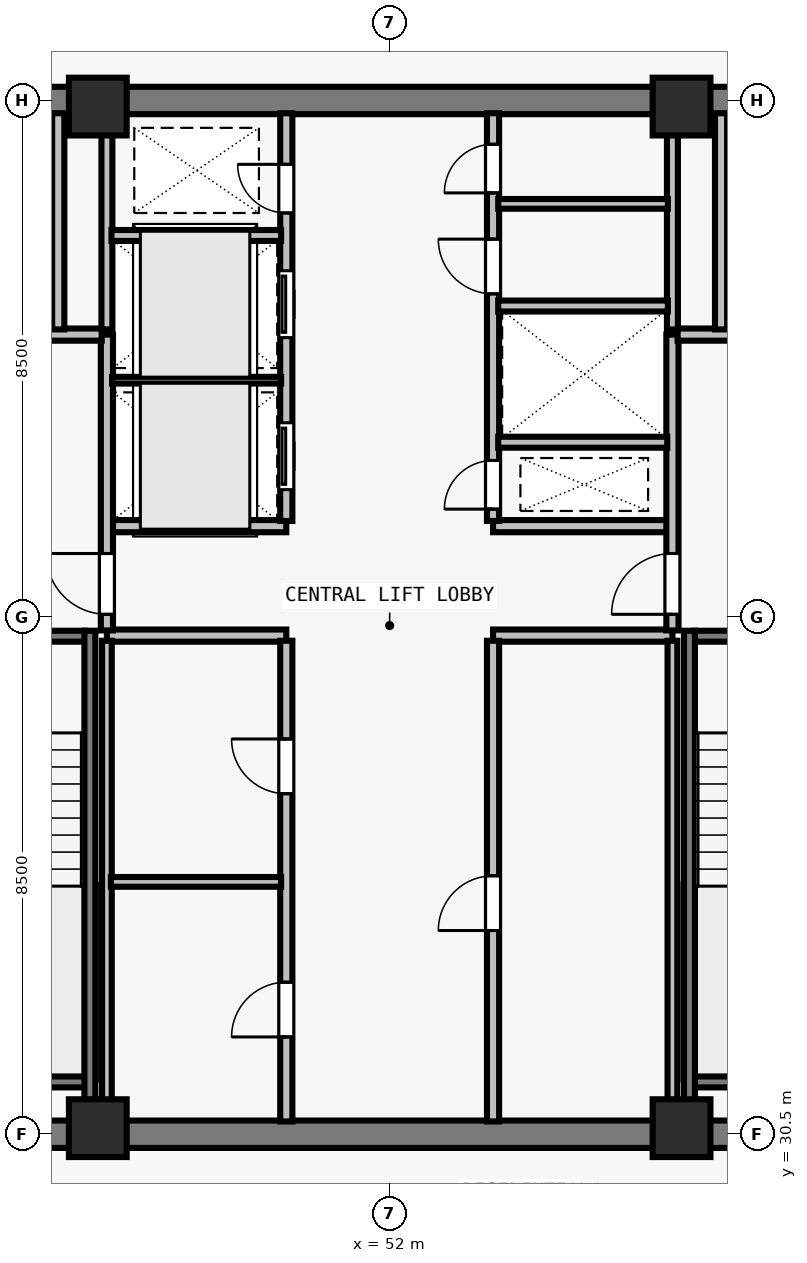
"""IFC4 building model, lengths in metres.
Left out: names, types, materials, properties, quantities, classifications, styles, units other than length and angle.
Written with IfcOpenShell. Run it as: python <this file> out.ifc"""

import sys

from ifc_helpers import new_model, si_unit, direction, frame, frame_2d, origin, origin_2d, place, context, subcontext, project, spatial, rectangle, extrude, element, fill, save


model = new_model("IFC4")
c1 = context("Model", 3, precision=1e-05, world=origin(), true_north=direction((0.0, 1.0)))
c2 = subcontext(c1, "Body", "Model", "MODEL_VIEW")
j1 = project(units=[si_unit("LENGTHUNIT", "METRE"), si_unit("PLANEANGLEUNIT", "RADIAN")], contexts=[c1])
p1 = place(None, origin())
s1 = spatial("IfcSite", under=j1, at=p1, CompositionType="ELEMENT")
p2 = place(p1, origin())
s2 = spatial("IfcBuilding", under=s1, at=p2, CompositionType="ELEMENT")
p3 = place(p2, frame((0.0, 0.0, 255.0)))
s3 = spatial("IfcBuildingStorey", under=s2, at=p3, CompositionType="ELEMENT", Elevation=255.0)
for number, where, z_axis, x_axis in (
    (1, (47.2, 30.6, 0.0), (0.0, 0.0, 1.0), (1.0, 0.0, 0.0)),
    (2, (56.8, 30.6, 0.0), (0.0, 0.0, 1.0), (1.0, 0.0, 0.0)),
    (3, (47.2, 47.4, 0.0), (0.0, 0.0, 1.0), (1.0, 0.0, 0.0)),
    (4, (56.8, 47.4, 0.0), (0.0, 0.0, 1.0), (1.0, 0.0, 0.0)),
):
    element("IfcColumn", number, at=place(p3, frame(where, z_axis=z_axis, x_axis=x_axis)), inside=s3, PredefinedType="COLUMN", context=c2, shape_type="SweptSolid", body=[
        extrude(rectangle(XDim=0.95, YDim=0.95, at=origin_2d()), origin(), (0.0, 0.0, 1.0), 3.5),
    ])
for number, where, z_axis, x_axis in (
    (5, (43.275, 30.5, 0.0), (0.0, 0.0, 1.0), (1.0, 0.0, 0.0)),
    (6, (43.275, 47.5, 0.0), (0.0, 0.0, 1.0), (1.0, 0.0, 0.0)),
):
    element("IfcWall", number, at=place(p3, frame(where, z_axis=z_axis, x_axis=x_axis)), inside=s3, PredefinedType="SHEAR", context=c2, shape_type="SweptSolid", body=[
        extrude(rectangle(XDim=17.45, YDim=0.45, at=frame_2d((8.725, 0.0))), origin(), (0.0, 0.0, 1.0), 3.29),
    ])
for number, where, z_axis, x_axis in (
    (7, (47.35, 38.7, 0.0), (0.0, 0.0, 1.0), (1.0, 0.0, 0.0)),
    (8, (47.35, 40.5, 0.0), (0.0, 0.0, 1.0), (1.0, 0.0, 0.0)),
    (9, (53.7, 38.7, 0.0), (0.0, 0.0, 1.0), (1.0, 0.0, 0.0)),
    (10, (53.7, 40.5, 0.0), (0.0, 0.0, 1.0), (1.0, 0.0, 0.0)),
):
    element("IfcWall", number, at=place(p3, frame(where, z_axis=z_axis, x_axis=x_axis)), inside=s3, PredefinedType="SOLIDWALL", context=c2, shape_type="SweptSolid", body=[
        extrude(rectangle(XDim=2.95, YDim=0.2, at=frame_2d((1.475, 0.0))), origin(), (0.0, 0.0, 1.0), 3.29),
    ])
p4 = place(p3, frame((50.3, 30.71, 0.0), z_axis=(0.0, 0.0, 1.0), x_axis=(0.0, 1.0, 0.0)))
e11 = element("IfcWall", 11, at=p4, inside=s3, PredefinedType="SOLIDWALL", context=c2, shape_type="SweptSolid", body=[
    extrude(rectangle(XDim=7.905, YDim=0.2, at=frame_2d((3.953, 0.0))), origin(), (0.0, 0.0, 1.0), 3.29),
])
p5 = place(p4, frame((1.39, 0.0, 0.0)))
e12 = element("IfcOpeningElement", 12, at=p5, cuts=e11, PredefinedType="OPENING", context=c2, shape_type="SweptSolid", body=[
    extrude(rectangle(XDim=0.9, YDim=2.12, at=frame_2d((0.45, 1.06))), frame((0.0, 0.11, 0.0), z_axis=(0.0, -1.0, 0.0), x_axis=(1.0, 0.0, 0.0)), (0.0, 0.0, 1.0), 0.22),
])
p6 = place(p4, frame((5.39, 0.0, 0.0)))
e13 = element("IfcOpeningElement", 13, at=p6, cuts=e11, PredefinedType="OPENING", context=c2, shape_type="SweptSolid", body=[
    extrude(rectangle(XDim=0.9, YDim=2.12, at=frame_2d((0.45, 1.06))), frame((0.0, 0.11, 0.0), z_axis=(0.0, -1.0, 0.0), x_axis=(1.0, 0.0, 0.0)), (0.0, 0.0, 1.0), 0.22),
])
p7 = place(p3, frame((53.7, 30.71, 0.0), z_axis=(0.0, 0.0, 1.0), x_axis=(0.0, 1.0, 0.0)))
e14 = element("IfcWall", 14, at=p7, inside=s3, PredefinedType="SOLIDWALL", context=c2, shape_type="SweptSolid", body=[
    extrude(rectangle(XDim=7.905, YDim=0.2, at=frame_2d((3.953, 0.0))), origin(), (0.0, 0.0, 1.0), 3.29),
])
p8 = place(p7, frame((3.14, 0.0, 0.0)))
e15 = element("IfcOpeningElement", 15, at=p8, cuts=e14, PredefinedType="OPENING", context=c2, shape_type="SweptSolid", body=[
    extrude(rectangle(XDim=0.9, YDim=2.12, at=frame_2d((0.45, 1.06))), frame((0.0, 0.11, 0.0), z_axis=(0.0, -1.0, 0.0), x_axis=(1.0, 0.0, 0.0)), (0.0, 0.0, 1.0), 0.22),
])
p9 = place(p3, frame((50.3, 40.585, 0.0), z_axis=(0.0, 0.0, 1.0), x_axis=(0.0, 1.0, 0.0)))
e16 = element("IfcWall", 16, at=p9, inside=s3, PredefinedType="SOLIDWALL", context=c2, shape_type="SweptSolid", body=[
    extrude(rectangle(XDim=6.705, YDim=0.2, at=frame_2d((3.353, 0.0))), origin(), (0.0, 0.0, 1.0), 3.29),
])
p10 = place(p9, frame((0.515, 0.0, 0.0)))
e17 = element("IfcOpeningElement", 17, at=p10, cuts=e16, PredefinedType="OPENING", context=c2, shape_type="SweptSolid", body=[
    extrude(rectangle(XDim=1.1, YDim=2.2, at=frame_2d((0.55, 1.1))), frame((0.0, 0.11, 0.0), z_axis=(0.0, -1.0, 0.0), x_axis=(1.0, 0.0, 0.0)), (0.0, 0.0, 1.0), 0.22),
])
p11 = place(p9, frame((3.015, 0.0, 0.0)))
e18 = element("IfcOpeningElement", 18, at=p11, cuts=e16, PredefinedType="OPENING", context=c2, shape_type="SweptSolid", body=[
    extrude(rectangle(XDim=1.1, YDim=2.2, at=frame_2d((0.55, 1.1))), frame((0.0, 0.11, 0.0), z_axis=(0.0, -1.0, 0.0), x_axis=(1.0, 0.0, 0.0)), (0.0, 0.0, 1.0), 0.22),
])
p12 = place(p9, frame((5.065, 0.0, 0.0)))
e19 = element("IfcOpeningElement", 19, at=p12, cuts=e16, PredefinedType="OPENING", context=c2, shape_type="SweptSolid", body=[
    extrude(rectangle(XDim=0.8, YDim=2.08, at=frame_2d((0.4, 1.04))), frame((0.0, 0.11, 0.0), z_axis=(0.0, -1.0, 0.0), x_axis=(1.0, 0.0, 0.0)), (0.0, 0.0, 1.0), 0.22),
])
p13 = place(p3, frame((53.7, 40.585, 0.0), z_axis=(0.0, 0.0, 1.0), x_axis=(0.0, 1.0, 0.0)))
e20 = element("IfcWall", 20, at=p13, inside=s3, PredefinedType="SOLIDWALL", context=c2, shape_type="SweptSolid", body=[
    extrude(rectangle(XDim=6.705, YDim=0.2, at=frame_2d((3.353, 0.0))), origin(), (0.0, 0.0, 1.0), 3.29),
])
p14 = place(p13, frame((0.195, 0.0, 0.0)))
e21 = element("IfcOpeningElement", 21, at=p14, cuts=e20, PredefinedType="OPENING", context=c2, shape_type="SweptSolid", body=[
    extrude(rectangle(XDim=0.8, YDim=2.08, at=frame_2d((0.4, 1.04))), frame((0.0, 0.11, 0.0), z_axis=(0.0, -1.0, 0.0), x_axis=(1.0, 0.0, 0.0)), (0.0, 0.0, 1.0), 0.22),
])
p15 = place(p13, frame((3.735, 0.0, 0.0)))
e22 = element("IfcOpeningElement", 22, at=p15, cuts=e20, PredefinedType="OPENING", context=c2, shape_type="SweptSolid", body=[
    extrude(rectangle(XDim=0.9, YDim=2.12, at=frame_2d((0.45, 1.06))), frame((0.0, 0.11, 0.0), z_axis=(0.0, -1.0, 0.0), x_axis=(1.0, 0.0, 0.0)), (0.0, 0.0, 1.0), 0.22),
])
p16 = place(p13, frame((5.395, 0.0, 0.0)))
e23 = element("IfcOpeningElement", 23, at=p16, cuts=e20, PredefinedType="OPENING", context=c2, shape_type="SweptSolid", body=[
    extrude(rectangle(XDim=0.8, YDim=2.1, at=frame_2d((0.4, 1.05))), frame((0.0, 0.11, 0.0), z_axis=(0.0, -1.0, 0.0), x_axis=(1.0, 0.0, 0.0)), (0.0, 0.0, 1.0), 0.22),
])
p17 = place(p3, frame((47.35, 38.785, 0.0), z_axis=(0.0, 0.0, 1.0), x_axis=(0.0, 1.0, 0.0)))
e24 = element("IfcWall", 24, at=p17, inside=s3, PredefinedType="SOLIDWALL", context=c2, shape_type="SweptSolid", body=[
    extrude(rectangle(XDim=4.865, YDim=0.2, at=frame_2d((2.433, 0.0))), origin(), (0.0, 0.0, 1.0), 3.29),
])
p18 = place(p17, frame((0.265, 0.0, 0.0)))
e25 = element("IfcOpeningElement", 25, at=p18, cuts=e24, PredefinedType="OPENING", context=c2, shape_type="SweptSolid", body=[
    extrude(rectangle(XDim=1.0, YDim=2.15, at=frame_2d((0.5, 1.075))), frame((0.0, 0.11, 0.0), z_axis=(0.0, -1.0, 0.0), x_axis=(1.0, 0.0, 0.0)), (0.0, 0.0, 1.0), 0.22),
])
p19 = place(p3, frame((43.71, 43.65, 0.0), z_axis=(0.0, 0.0, 1.0), x_axis=(1.0, 0.0, 0.0)))
e26 = element("IfcWall", 26, at=p19, inside=s3, PredefinedType="SOLIDWALL", context=c2, shape_type="SweptSolid", body=[
    extrude(rectangle(XDim=3.555, YDim=0.2, at=frame_2d((1.777, 0.0))), origin(), (0.0, 0.0, 1.0), 3.29),
])
p20 = place(p19, frame((1.16, 0.0, 0.0)))
e27 = element("IfcOpeningElement", 27, at=p20, cuts=e26, PredefinedType="OPENING", context=c2, shape_type="SweptSolid", body=[
    extrude(rectangle(XDim=1.1, YDim=2.2, at=frame_2d((0.55, 1.1))), frame((0.0, 0.11, 0.0), z_axis=(0.0, -1.0, 0.0), x_axis=(1.0, 0.0, 0.0)), (0.0, 0.0, 1.0), 0.22),
])
p21 = place(p3, frame((46.55, 43.735, 0.0), z_axis=(0.0, 0.0, 1.0), x_axis=(0.0, 1.0, 0.0)))
e28 = element("IfcWall", 28, at=p21, inside=s3, PredefinedType="SOLIDWALL", context=c2, shape_type="SweptSolid", body=[
    extrude(rectangle(XDim=3.555, YDim=0.2, at=frame_2d((1.777, 0.0))), origin(), (0.0, 0.0, 1.0), 3.29),
])
p22 = place(p3, frame((56.65, 38.785, 0.0), z_axis=(0.0, 0.0, 1.0), x_axis=(0.0, 1.0, 0.0)))
e29 = element("IfcWall", 29, at=p22, inside=s3, PredefinedType="SOLIDWALL", context=c2, shape_type="SweptSolid", body=[
    extrude(rectangle(XDim=4.865, YDim=0.2, at=frame_2d((2.433, 0.0))), origin(), (0.0, 0.0, 1.0), 3.29),
])
p23 = place(p22, frame((0.265, 0.0, 0.0)))
e30 = element("IfcOpeningElement", 30, at=p23, cuts=e29, PredefinedType="OPENING", context=c2, shape_type="SweptSolid", body=[
    extrude(rectangle(XDim=1.0, YDim=2.15, at=frame_2d((0.5, 1.075))), frame((0.0, 0.11, 0.0), z_axis=(0.0, -1.0, 0.0), x_axis=(1.0, 0.0, 0.0)), (0.0, 0.0, 1.0), 0.22),
])
p24 = place(p3, frame((56.735, 43.65, 0.0), z_axis=(0.0, 0.0, 1.0), x_axis=(1.0, 0.0, 0.0)))
e31 = element("IfcWall", 31, at=p24, inside=s3, PredefinedType="SOLIDWALL", context=c2, shape_type="SweptSolid", body=[
    extrude(rectangle(XDim=3.555, YDim=0.2, at=frame_2d((1.777, 0.0))), origin(), (0.0, 0.0, 1.0), 3.29),
])
p25 = place(p24, frame((1.295, 0.0, 0.0)))
e32 = element("IfcOpeningElement", 32, at=p25, cuts=e31, PredefinedType="OPENING", context=c2, shape_type="SweptSolid", body=[
    extrude(rectangle(XDim=1.1, YDim=2.2, at=frame_2d((0.55, 1.1))), frame((0.0, 0.11, 0.0), z_axis=(0.0, -1.0, 0.0), x_axis=(1.0, 0.0, 0.0)), (0.0, 0.0, 1.0), 0.22),
])
p26 = place(p3, frame((57.45, 43.735, 0.0), z_axis=(0.0, 0.0, 1.0), x_axis=(0.0, 1.0, 0.0)))
e33 = element("IfcWall", 33, at=p26, inside=s3, PredefinedType="SOLIDWALL", context=c2, shape_type="SweptSolid", body=[
    extrude(rectangle(XDim=3.555, YDim=0.2, at=frame_2d((1.777, 0.0))), origin(), (0.0, 0.0, 1.0), 3.29),
])
p27 = place(p3, frame((47.35, 30.71, 0.0), z_axis=(0.0, 0.0, 1.0), x_axis=(0.0, 1.0, 0.0)))
e34 = element("IfcWall", 34, at=p27, inside=s3, PredefinedType="PARTITIONING", context=c2, shape_type="SweptSolid", body=[
    extrude(rectangle(XDim=7.905, YDim=0.16, at=frame_2d((3.953, 0.0))), origin(), (0.0, 0.0, 1.0), 3.29),
])
p28 = place(p3, frame((47.415, 34.65, 0.0), z_axis=(0.0, 0.0, 1.0), x_axis=(1.0, 0.0, 0.0)))
e35 = element("IfcWall", 35, at=p28, inside=s3, PredefinedType="PARTITIONING", context=c2, shape_type="SweptSolid", body=[
    extrude(rectangle(XDim=2.8, YDim=0.16, at=frame_2d((1.4, 0.0))), origin(), (0.0, 0.0, 1.0), 3.29),
])
p29 = place(p3, frame((56.65, 30.71, 0.0), z_axis=(0.0, 0.0, 1.0), x_axis=(0.0, 1.0, 0.0)))
e36 = element("IfcWall", 36, at=p29, inside=s3, PredefinedType="PARTITIONING", context=c2, shape_type="SweptSolid", body=[
    extrude(rectangle(XDim=7.905, YDim=0.16, at=frame_2d((3.953, 0.0))), origin(), (0.0, 0.0, 1.0), 3.29),
])
p30 = place(p3, frame((47.35, 43.735, 0.0), z_axis=(0.0, 0.0, 1.0), x_axis=(0.0, 1.0, 0.0)))
e37 = element("IfcWall", 37, at=p30, inside=s3, PredefinedType="SOLIDWALL", context=c2, shape_type="SweptSolid", body=[
    extrude(rectangle(XDim=3.555, YDim=0.18, at=frame_2d((1.777, 0.0))), origin(), (0.0, 0.0, 1.0), 3.29),
])
p31 = place(p3, frame((47.435, 42.9, 0.0), z_axis=(0.0, 0.0, 1.0), x_axis=(1.0, 0.0, 0.0)))
e38 = element("IfcWall", 38, at=p31, inside=s3, PredefinedType="PARTITIONING", context=c2, shape_type="SweptSolid", body=[
    extrude(rectangle(XDim=2.78, YDim=0.11, at=frame_2d((1.39, 0.0))), origin(), (0.0, 0.0, 1.0), 3.29),
])
p32 = place(p3, frame((47.425, 45.28, 0.0), z_axis=(0.0, 0.0, 1.0), x_axis=(1.0, 0.0, 0.0)))
e39 = element("IfcWall", 39, at=p32, inside=s3, PredefinedType="SOLIDWALL", context=c2, shape_type="SweptSolid", body=[
    extrude(rectangle(XDim=2.79, YDim=0.18, at=frame_2d((1.395, 0.0))), origin(), (0.0, 0.0, 1.0), 3.29),
])
p33 = place(p3, frame((56.65, 43.735, 0.0), z_axis=(0.0, 0.0, 1.0), x_axis=(0.0, 1.0, 0.0)))
e40 = element("IfcWall", 40, at=p33, inside=s3, PredefinedType="SOLIDWALL", context=c2, shape_type="SweptSolid", body=[
    extrude(rectangle(XDim=3.555, YDim=0.18, at=frame_2d((1.777, 0.0))), origin(), (0.0, 0.0, 1.0), 3.29),
])
p34 = place(p3, frame((53.785, 41.88, 0.0), z_axis=(0.0, 0.0, 1.0), x_axis=(1.0, 0.0, 0.0)))
e41 = element("IfcWall", 41, at=p34, inside=s3, PredefinedType="SOLIDWALL", context=c2, shape_type="SweptSolid", body=[
    extrude(rectangle(XDim=2.78, YDim=0.18, at=frame_2d((1.39, 0.0))), origin(), (0.0, 0.0, 1.0), 3.29),
])
p35 = place(p3, frame((53.785, 44.12, 0.0), z_axis=(0.0, 0.0, 1.0), x_axis=(1.0, 0.0, 0.0)))
e42 = element("IfcWall", 42, at=p35, inside=s3, PredefinedType="SOLIDWALL", context=c2, shape_type="SweptSolid", body=[
    extrude(rectangle(XDim=2.79, YDim=0.18, at=frame_2d((1.395, 0.0))), origin(), (0.0, 0.0, 1.0), 3.29),
])
p36 = place(p3, frame((53.785, 45.8, 0.0), z_axis=(0.0, 0.0, 1.0), x_axis=(1.0, 0.0, 0.0)))
e43 = element("IfcWall", 43, at=p36, inside=s3, PredefinedType="PARTITIONING", context=c2, shape_type="SweptSolid", body=[
    extrude(rectangle(XDim=2.79, YDim=0.16, at=frame_2d((1.395, 0.0))), origin(), (0.0, 0.0, 1.0), 3.29),
])
p37 = place(p3, frame((43.715, 38.69, 0.0), z_axis=(0.0, 0.0, 1.0), x_axis=(1.0, 0.0, 0.0)))
e44 = element("IfcWall", 44, at=p37, inside=s3, PredefinedType="SOLIDWALL", context=c2, shape_type="SweptSolid", body=[
    extrude(rectangle(XDim=3.28, YDim=0.18, at=frame_2d((1.64, 0.0))), origin(), (0.0, 0.0, 1.0), 3.29),
])
p38 = place(p37, frame((1.165, 0.0, 0.0)))
e45 = element("IfcOpeningElement", 45, at=p38, cuts=e44, PredefinedType="OPENING", context=c2, shape_type="SweptSolid", body=[
    extrude(rectangle(XDim=0.95, YDim=2.15, at=frame_2d((0.475, 1.075))), frame((0.0, 0.1, 0.0), z_axis=(0.0, -1.0, 0.0), x_axis=(1.0, 0.0, 0.0)), (0.0, 0.0, 1.0), 0.2),
])
p39 = place(p3, frame((43.715, 31.36, 0.0), z_axis=(0.0, 0.0, 1.0), x_axis=(1.0, 0.0, 0.0)))
e46 = element("IfcWall", 46, at=p39, inside=s3, PredefinedType="SOLIDWALL", context=c2, shape_type="SweptSolid", body=[
    extrude(rectangle(XDim=3.28, YDim=0.18, at=frame_2d((1.64, 0.0))), origin(), (0.0, 0.0, 1.0), 3.29),
])
p40 = place(p3, frame((47.07, 38.78, 0.0), z_axis=(0.0, 0.0, 1.0), x_axis=(0.0, -1.0, 0.0)))
e47 = element("IfcWall", 47, at=p40, inside=s3, PredefinedType="SOLIDWALL", context=c2, shape_type="SweptSolid", body=[
    extrude(rectangle(XDim=8.067, YDim=0.18, at=frame_2d((4.034, 0.0))), origin(), (0.0, 0.0, 1.0), 3.29),
])
p41 = place(p3, frame((57.005, 38.69, 0.0), z_axis=(0.0, 0.0, 1.0), x_axis=(1.0, 0.0, 0.0)))
e48 = element("IfcWall", 48, at=p41, inside=s3, PredefinedType="SOLIDWALL", context=c2, shape_type="SweptSolid", body=[
    extrude(rectangle(XDim=3.28, YDim=0.18, at=frame_2d((1.64, 0.0))), origin(), (0.0, 0.0, 1.0), 3.29),
])
p42 = place(p41, frame((1.165, 0.0, 0.0)))
e49 = element("IfcOpeningElement", 49, at=p42, cuts=e48, PredefinedType="OPENING", context=c2, shape_type="SweptSolid", body=[
    extrude(rectangle(XDim=0.95, YDim=2.15, at=frame_2d((0.475, 1.075))), frame((0.0, 0.1, 0.0), z_axis=(0.0, -1.0, 0.0), x_axis=(1.0, 0.0, 0.0)), (0.0, 0.0, 1.0), 0.2),
])
p43 = place(p3, frame((57.005, 31.36, 0.0), z_axis=(0.0, 0.0, 1.0), x_axis=(1.0, 0.0, 0.0)))
e50 = element("IfcWall", 50, at=p43, inside=s3, PredefinedType="SOLIDWALL", context=c2, shape_type="SweptSolid", body=[
    extrude(rectangle(XDim=3.28, YDim=0.18, at=frame_2d((1.64, 0.0))), origin(), (0.0, 0.0, 1.0), 3.29),
])
p44 = place(p3, frame((56.93, 38.78, 0.0), z_axis=(0.0, 0.0, 1.0), x_axis=(0.0, -1.0, 0.0)))
e51 = element("IfcWall", 51, at=p44, inside=s3, PredefinedType="SOLIDWALL", context=c2, shape_type="SweptSolid", body=[
    extrude(rectangle(XDim=8.067, YDim=0.18, at=frame_2d((4.034, 0.0))), origin(), (0.0, 0.0, 1.0), 3.29),
])
p45 = place(p18, origin())
e52 = element("IfcDoor", 52, at=p45, inside=s3, OperationType="SINGLE_SWING_RIGHT", PredefinedType="DOOR", context=c2, shape_type="SweptSolid", body=[
    extrude(rectangle(XDim=1.0, YDim=2.15, at=frame_2d((0.5, 1.075))), frame((0.0, 0.025, 0.0), z_axis=(0.0, -1.0, 0.0), x_axis=(1.0, 0.0, 0.0)), (0.0, 0.0, 1.0), 0.05),
])
fill(e25, e52)
p46 = place(p23, origin())
e53 = element("IfcDoor", 53, at=p46, inside=s3, OperationType="SINGLE_SWING_LEFT", PredefinedType="DOOR", context=c2, shape_type="SweptSolid", body=[
    extrude(rectangle(XDim=1.0, YDim=2.15, at=frame_2d((0.5, 1.075))), frame((0.0, 0.025, 0.0), z_axis=(0.0, -1.0, 0.0), x_axis=(1.0, 0.0, 0.0)), (0.0, 0.0, 1.0), 0.05),
])
fill(e30, e53)
p47 = place(p5, origin())
e54 = element("IfcDoor", 54, at=p47, inside=s3, OperationType="SINGLE_SWING_LEFT", PredefinedType="DOOR", context=c2, shape_type="SweptSolid", body=[
    extrude(rectangle(XDim=0.9, YDim=2.12, at=frame_2d((0.45, 1.06))), frame((0.0, 0.025, 0.0), z_axis=(0.0, -1.0, 0.0), x_axis=(1.0, 0.0, 0.0)), (0.0, 0.0, 1.0), 0.05),
])
fill(e12, e54)
p48 = place(p6, origin())
e55 = element("IfcDoor", 55, at=p48, inside=s3, OperationType="SINGLE_SWING_RIGHT", PredefinedType="DOOR", context=c2, shape_type="SweptSolid", body=[
    extrude(rectangle(XDim=0.9, YDim=2.12, at=frame_2d((0.45, 1.06))), frame((0.0, 0.025, 0.0), z_axis=(0.0, -1.0, 0.0), x_axis=(1.0, 0.0, 0.0)), (0.0, 0.0, 1.0), 0.05),
])
fill(e13, e55)
p49 = place(p8, origin())
e56 = element("IfcDoor", 56, at=p49, inside=s3, OperationType="SINGLE_SWING_LEFT", PredefinedType="DOOR", context=c2, shape_type="SweptSolid", body=[
    extrude(rectangle(XDim=0.9, YDim=2.12, at=frame_2d((0.45, 1.06))), frame((0.0, 0.025, 0.0), z_axis=(0.0, -1.0, 0.0), x_axis=(1.0, 0.0, 0.0)), (0.0, 0.0, 1.0), 0.05),
])
fill(e15, e56)
p50 = place(p10, origin())
e57 = element("IfcDoor", 57, at=p50, inside=s3, OperationType="SLIDING_TO_LEFT", PredefinedType="DOOR", context=c2, shape_type="SweptSolid", body=[
    extrude(rectangle(XDim=1.1, YDim=2.2, at=frame_2d((0.55, 1.1))), frame((0.0, 0.025, 0.0), z_axis=(0.0, -1.0, 0.0), x_axis=(1.0, 0.0, 0.0)), (0.0, 0.0, 1.0), 0.05),
])
fill(e17, e57)
p51 = place(p11, origin())
e58 = element("IfcDoor", 58, at=p51, inside=s3, OperationType="SLIDING_TO_LEFT", PredefinedType="DOOR", context=c2, shape_type="SweptSolid", body=[
    extrude(rectangle(XDim=1.1, YDim=2.2, at=frame_2d((0.55, 1.1))), frame((0.0, 0.025, 0.0), z_axis=(0.0, -1.0, 0.0), x_axis=(1.0, 0.0, 0.0)), (0.0, 0.0, 1.0), 0.05),
])
fill(e18, e58)
p52 = place(p12, origin())
e59 = element("IfcDoor", 59, at=p52, inside=s3, OperationType="SINGLE_SWING_RIGHT", PredefinedType="DOOR", context=c2, shape_type="SweptSolid", body=[
    extrude(rectangle(XDim=0.8, YDim=2.08, at=frame_2d((0.4, 1.04))), frame((0.0, 0.025, 0.0), z_axis=(0.0, -1.0, 0.0), x_axis=(1.0, 0.0, 0.0)), (0.0, 0.0, 1.0), 0.05),
])
fill(e19, e59)
p53 = place(p14, origin())
e60 = element("IfcDoor", 60, at=p53, inside=s3, OperationType="SINGLE_SWING_LEFT", PredefinedType="DOOR", context=c2, shape_type="SweptSolid", body=[
    extrude(rectangle(XDim=0.8, YDim=2.08, at=frame_2d((0.4, 1.04))), frame((0.0, 0.025, 0.0), z_axis=(0.0, -1.0, 0.0), x_axis=(1.0, 0.0, 0.0)), (0.0, 0.0, 1.0), 0.05),
])
fill(e21, e60)
p54 = place(p15, origin())
e61 = element("IfcDoor", 61, at=p54, inside=s3, OperationType="SINGLE_SWING_RIGHT", PredefinedType="DOOR", context=c2, shape_type="SweptSolid", body=[
    extrude(rectangle(XDim=0.9, YDim=2.12, at=frame_2d((0.45, 1.06))), frame((0.0, 0.025, 0.0), z_axis=(0.0, -1.0, 0.0), x_axis=(1.0, 0.0, 0.0)), (0.0, 0.0, 1.0), 0.05),
])
fill(e22, e61)
p55 = place(p16, origin())
e62 = element("IfcDoor", 62, at=p55, inside=s3, OperationType="SINGLE_SWING_LEFT", PredefinedType="DOOR", context=c2, shape_type="SweptSolid", body=[
    extrude(rectangle(XDim=0.8, YDim=2.1, at=frame_2d((0.4, 1.05))), frame((0.0, 0.025, 0.0), z_axis=(0.0, -1.0, 0.0), x_axis=(1.0, 0.0, 0.0)), (0.0, 0.0, 1.0), 0.05),
])
fill(e23, e62)
save(model, sys.argv[1])
